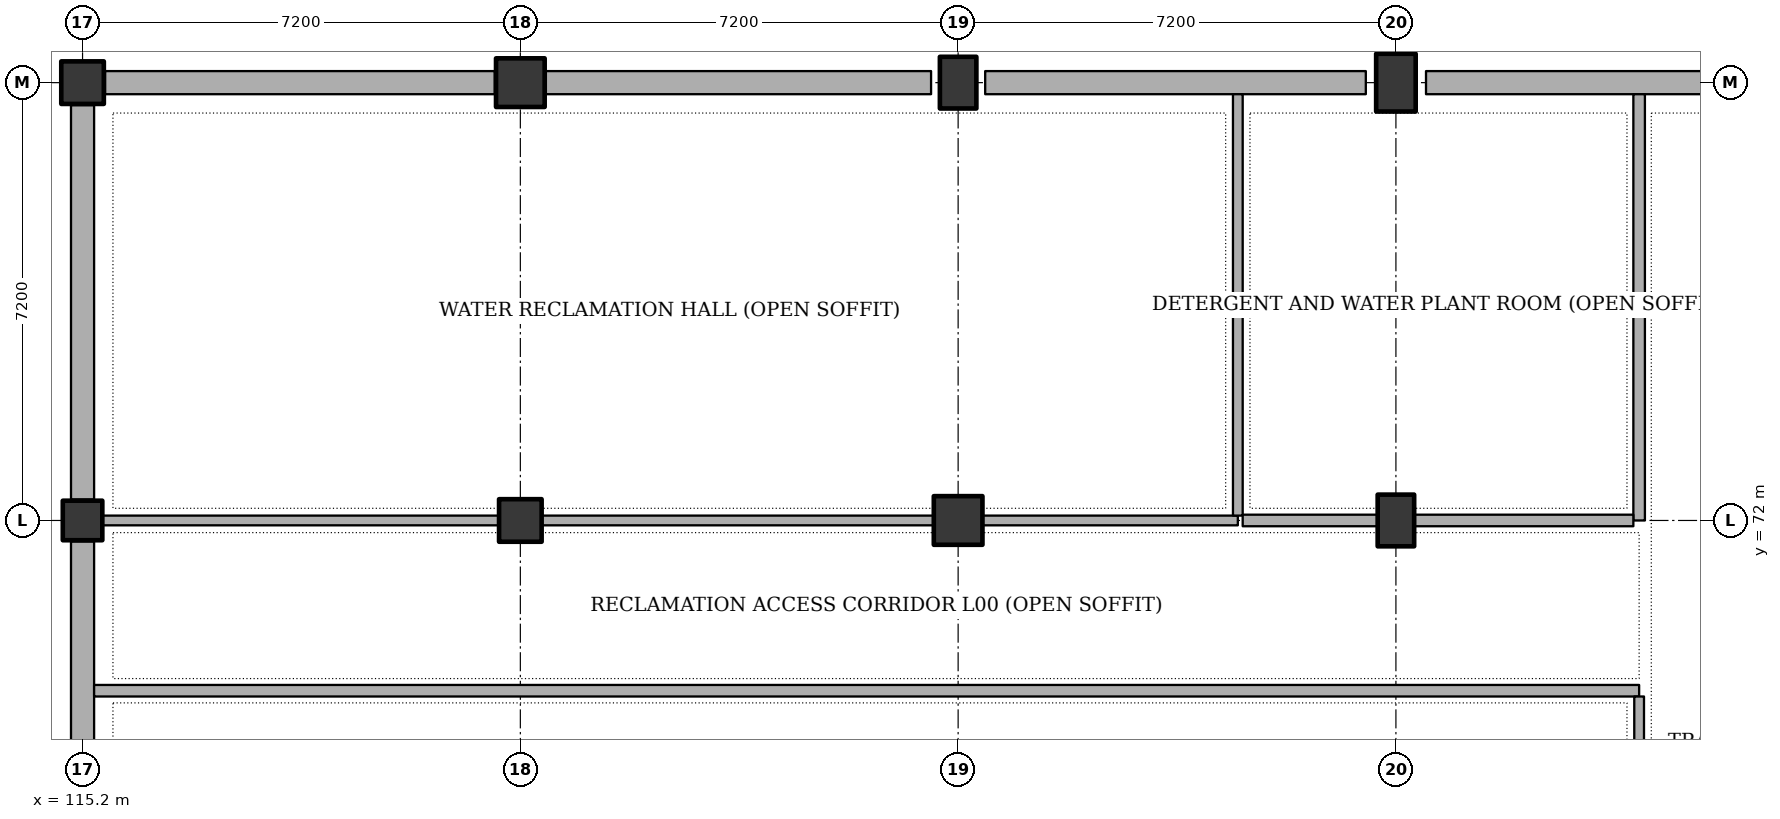
"""IFC4 building model, lengths in metres.
Left out: names, types, materials, properties, quantities, classifications, styles, units other than length and angle.
Written with IfcOpenShell. Run it as: python <this file> out.ifc"""

import sys

from ifc_helpers import new_model, si_unit, direction, frame, frame_2d, origin, origin_2d, place, context, subcontext, project, spatial, rectangle, extrude, element, fill, save


model = new_model("IFC4")
c1 = context("Model", 3, precision=1e-05, world=origin(), true_north=direction((0.0, 1.0)))
c2 = subcontext(c1, "Body", "Model", "MODEL_VIEW")
j1 = project(units=[si_unit("LENGTHUNIT", "METRE"), si_unit("PLANEANGLEUNIT", "RADIAN")], contexts=[c1])
p1 = place(None, origin())
s1 = spatial("IfcSite", under=j1, at=p1, CompositionType="ELEMENT")
p2 = place(p1, origin())
s2 = spatial("IfcBuilding", under=s1, at=p2, CompositionType="ELEMENT")
p3 = place(p2, origin())
s3 = spatial("IfcBuildingStorey", under=s2, at=p3, CompositionType="ELEMENT", Elevation=0.0)
p4 = place(p3, frame((115.2, 72.0, -0.3), z_axis=(0.0, 0.0, 1.0), x_axis=(1.0, 0.0, 0.0)))
e1 = element("IfcColumn", 1, at=p4, inside=s3, PredefinedType="COLUMN", context=c2, shape_type="SweptSolid", body=[
    extrude(rectangle(XDim=0.65, YDim=0.65, at=origin_2d()), origin(), (0.0, 0.0, 1.0), 5.7),
])
for number, where, z_axis, x_axis in (
    (2, (115.2, 79.2, -0.3), (0.0, 0.0, 1.0), (1.0, 0.0, 0.0)),
    (3, (122.4, 72.0, -0.3), (0.0, 0.0, 1.0), (1.0, 0.0, 0.0)),
):
    element("IfcColumn", number, at=place(p3, frame(where, z_axis=z_axis, x_axis=x_axis)), inside=s3, PredefinedType="COLUMN", context=c2, shape_type="SweptSolid", body=[
        extrude(rectangle(XDim=0.7, YDim=0.7, at=origin_2d()), origin(), (0.0, 0.0, 1.0), 5.7),
    ])
for number, where, z_axis, x_axis in (
    (4, (122.4, 79.2, -0.3), (0.0, 0.0, 1.0), (1.0, 0.0, 0.0)),
    (5, (129.6, 72.0, -0.3), (0.0, 0.0, 1.0), (1.0, 0.0, 0.0)),
):
    element("IfcColumn", number, at=place(p3, frame(where, z_axis=z_axis, x_axis=x_axis)), inside=s3, PredefinedType="COLUMN", context=c2, shape_type="SweptSolid", body=[
        extrude(rectangle(XDim=0.8, YDim=0.8, at=origin_2d()), origin(), (0.0, 0.0, 1.0), 5.7),
    ])
for number, where, z_axis, x_axis in (
    (6, (129.6, 79.2, -0.3), (0.0, 0.0, 1.0), (1.0, 0.0, 0.0)),
    (7, (136.8, 72.0, -0.3), (0.0, 0.0, 1.0), (1.0, 0.0, 0.0)),
):
    element("IfcColumn", number, at=place(p3, frame(where, z_axis=z_axis, x_axis=x_axis)), inside=s3, PredefinedType="COLUMN", context=c2, shape_type="SweptSolid", body=[
        extrude(rectangle(XDim=0.6, YDim=0.85, at=origin_2d()), origin(), (0.0, 0.0, 1.0), 5.7),
    ])
p5 = place(p3, frame((136.8, 79.2, -0.3), z_axis=(0.0, 0.0, 1.0), x_axis=(1.0, 0.0, 0.0)))
e8 = element("IfcColumn", 8, at=p5, inside=s3, PredefinedType="COLUMN", context=c2, shape_type="SweptSolid", body=[
    extrude(rectangle(XDim=0.65, YDim=0.95, at=origin_2d()), origin(), (0.0, 0.0, 1.0), 5.7),
])
p6 = place(p3, frame((115.2, 65.095, 0.0), z_axis=(0.0, 0.0, 1.0), x_axis=(0.0, 1.0, 0.0)))
e9 = element("IfcWall", 9, at=p6, inside=s3, PredefinedType="SOLIDWALL", context=c2, shape_type="SweptSolid", body=[
    extrude(rectangle(XDim=6.56, YDim=0.38, at=frame_2d((3.28, 0.0))), origin(), (0.0, 0.0, 1.0), 4.523),
])
p7 = place(p6, frame((1.43, 0.0, 0.0)))
e10 = element("IfcOpeningElement", 10, at=p7, cuts=e9, PredefinedType="OPENING", context=c2, shape_type="SweptSolid", body=[
    extrude(rectangle(XDim=3.7, YDim=4.4, at=frame_2d((1.85, 2.2))), frame((0.0, 0.2, 0.0), z_axis=(0.0, -1.0, 0.0), x_axis=(1.0, 0.0, 0.0)), (0.0, 0.0, 1.0), 0.4),
])
p8 = place(p3, frame((115.2, 72.345, 0.0), z_axis=(0.0, 0.0, 1.0), x_axis=(0.0, 1.0, 0.0)))
e11 = element("IfcWall", 11, at=p8, inside=s3, PredefinedType="SOLIDWALL", context=c2, shape_type="SweptSolid", body=[
    extrude(rectangle(XDim=6.485, YDim=0.38, at=frame_2d((3.243, 0.0))), origin(), (0.0, 0.0, 1.0), 4.6),
])
p9 = place(p8, frame((2.593, 0.0, 1.05)))
e12 = element("IfcOpeningElement", 12, at=p9, cuts=e11, PredefinedType="OPENING", context=c2, shape_type="SweptSolid", body=[
    extrude(rectangle(XDim=1.3, YDim=1.6, at=frame_2d((0.65, 0.8))), frame((0.0, 0.2, 0.0), z_axis=(0.0, -1.0, 0.0), x_axis=(1.0, 0.0, 0.0)), (0.0, 0.0, 1.0), 0.4),
])
p10 = place(p3, frame((115.57, 79.2, 0.0), z_axis=(0.0, 0.0, 1.0), x_axis=(1.0, 0.0, 0.0)))
e13 = element("IfcWall", 13, at=p10, inside=s3, PredefinedType="SOLIDWALL", context=c2, shape_type="SweptSolid", body=[
    extrude(rectangle(XDim=6.41, YDim=0.38, at=frame_2d((3.205, 0.0))), origin(), (0.0, 0.0, 1.0), 4.65),
])
p11 = place(p3, frame((122.82, 79.2, 0.0), z_axis=(0.0, 0.0, 1.0), x_axis=(1.0, 0.0, 0.0)))
e14 = element("IfcWall", 14, at=p11, inside=s3, PredefinedType="SOLIDWALL", context=c2, shape_type="SweptSolid", body=[
    extrude(rectangle(XDim=6.335, YDim=0.38, at=frame_2d((3.167, 0.0))), origin(), (0.0, 0.0, 1.0), 4.65),
])
p12 = place(p11, frame((2.192, 0.0, 1.05)))
e15 = element("IfcOpeningElement", 15, at=p12, cuts=e14, PredefinedType="OPENING", context=c2, shape_type="SweptSolid", body=[
    extrude(rectangle(XDim=1.95, YDim=2.25, at=frame_2d((0.975, 1.125))), frame((0.0, 0.2, 0.0), z_axis=(0.0, -1.0, 0.0), x_axis=(1.0, 0.0, 0.0)), (0.0, 0.0, 1.0), 0.4),
])
p13 = place(p3, frame((130.045, 79.2, 0.0), z_axis=(0.0, 0.0, 1.0), x_axis=(1.0, 0.0, 0.0)))
e16 = element("IfcWall", 16, at=p13, inside=s3, PredefinedType="SOLIDWALL", context=c2, shape_type="SweptSolid", body=[
    extrude(rectangle(XDim=6.26, YDim=0.38, at=frame_2d((3.13, 0.0))), origin(), (0.0, 0.0, 1.0), 4.65),
])
p14 = place(p3, frame((137.295, 79.2, 0.0), z_axis=(0.0, 0.0, 1.0), x_axis=(1.0, 0.0, 0.0)))
e17 = element("IfcWall", 17, at=p14, inside=s3, PredefinedType="SOLIDWALL", context=c2, shape_type="SweptSolid", body=[
    extrude(rectangle(XDim=6.547, YDim=0.38, at=frame_2d((3.273, 0.0))), origin(), (0.0, 0.0, 1.0), 4.6),
])
p15 = place(p14, frame((4.35, 0.0, 0.0)))
e18 = element("IfcOpeningElement", 18, at=p15, cuts=e17, PredefinedType="OPENING", context=c2, shape_type="SweptSolid", body=[
    extrude(rectangle(XDim=1.35, YDim=2.15, at=frame_2d((0.675, 1.075))), frame((0.0, 0.2, 0.0), z_axis=(0.0, -1.0, 0.0), x_axis=(1.0, 0.0, 0.0)), (0.0, 0.0, 1.0), 0.4),
])
p16 = place(p3, frame((115.39, 69.2, 0.0), z_axis=(0.0, 0.0, 1.0), x_axis=(1.0, 0.0, 0.0)))
e19 = element("IfcWall", 19, at=p16, inside=s3, PredefinedType="PARTITIONING", context=c2, shape_type="SweptSolid", body=[
    extrude(rectangle(XDim=25.41, YDim=0.19, at=frame_2d((12.705, 0.0))), origin(), (0.0, 0.0, 1.0), 3.55),
])
p17 = place(p16, frame((17.612, 0.0, 0.0)))
e20 = element("IfcOpeningElement", 20, at=p17, cuts=e19, PredefinedType="OPENING", context=c2, shape_type="SweptSolid", body=[
    extrude(rectangle(XDim=1.75, YDim=2.25, at=frame_2d((0.875, 1.125))), frame((0.0, 0.105, 0.0), z_axis=(0.0, -1.0, 0.0), x_axis=(1.0, 0.0, 0.0)), (0.0, 0.0, 1.0), 0.21),
])
p18 = place(p3, frame((115.527, 72.0, 0.0), z_axis=(0.0, 0.0, 1.0), x_axis=(1.0, 0.0, 0.0)))
e21 = element("IfcWall", 21, at=p18, inside=s3, PredefinedType="PARTITIONING", context=c2, shape_type="SweptSolid", body=[
    extrude(rectangle(XDim=6.521, YDim=0.16, at=frame_2d((3.26, 0.0))), origin(), (0.0, 0.0, 1.0), 3.55),
])
p19 = place(p3, frame((122.752, 72.0, 0.0), z_axis=(0.0, 0.0, 1.0), x_axis=(1.0, 0.0, 0.0)))
e22 = element("IfcWall", 22, at=p19, inside=s3, PredefinedType="PARTITIONING", context=c2, shape_type="SweptSolid", body=[
    extrude(rectangle(XDim=6.446, YDim=0.16, at=frame_2d((3.223, 0.0))), origin(), (0.0, 0.0, 1.0), 3.55),
])
p20 = place(p19, frame((2.348, 0.0, 0.0)))
e23 = element("IfcOpeningElement", 23, at=p20, cuts=e22, PredefinedType="OPENING", context=c2, shape_type="SweptSolid", body=[
    extrude(rectangle(XDim=1.75, YDim=2.25, at=frame_2d((0.875, 1.125))), frame((0.0, 0.09, 0.0), z_axis=(0.0, -1.0, 0.0), x_axis=(1.0, 0.0, 0.0)), (0.0, 0.0, 1.0), 0.18),
])
p21 = place(p3, frame((130.002, 72.0, 0.0), z_axis=(0.0, 0.0, 1.0), x_axis=(1.0, 0.0, 0.0)))
e24 = element("IfcWall", 24, at=p21, inside=s3, PredefinedType="PARTITIONING", context=c2, shape_type="SweptSolid", body=[
    extrude(rectangle(XDim=4.198, YDim=0.16, at=frame_2d((2.099, 0.0))), origin(), (0.0, 0.0, 1.0), 3.55),
])
p22 = place(p3, frame((140.8, 72.0, 0.0), z_axis=(0.0, 0.0, 1.0), x_axis=(0.0, 1.0, 0.0)))
e25 = element("IfcWall", 25, at=p22, inside=s3, PredefinedType="PARTITIONING", context=c2, shape_type="SweptSolid", body=[
    extrude(rectangle(XDim=7.01, YDim=0.19, at=frame_2d((3.505, 0.0))), origin(), (0.0, 0.0, 1.0), 3.55),
])
p23 = place(p22, frame((2.825, 0.0, 0.0)))
e26 = element("IfcOpeningElement", 26, at=p23, cuts=e25, PredefinedType="OPENING", context=c2, shape_type="SweptSolid", body=[
    extrude(rectangle(XDim=1.25, YDim=2.15, at=frame_2d((0.625, 1.075))), frame((0.0, 0.105, 0.0), z_axis=(0.0, -1.0, 0.0), x_axis=(1.0, 0.0, 0.0)), (0.0, 0.0, 1.0), 0.21),
])
p24 = place(p3, frame((140.8, 50.59, 0.0), z_axis=(0.0, 0.0, 1.0), x_axis=(0.0, 1.0, 0.0)))
e27 = element("IfcWall", 27, at=p24, inside=s3, PredefinedType="PARTITIONING", context=c2, shape_type="SweptSolid", body=[
    extrude(rectangle(XDim=18.515, YDim=0.16, at=frame_2d((9.257, 0.0))), origin(), (0.0, 0.0, 1.0), 3.55),
])
p25 = place(p3, frame((134.2, 72.08, 0.0), z_axis=(0.0, 0.0, 1.0), x_axis=(0.0, 1.0, 0.0)))
e28 = element("IfcWall", 28, at=p25, inside=s3, PredefinedType="PARTITIONING", context=c2, shape_type="SweptSolid", body=[
    extrude(rectangle(XDim=6.93, YDim=0.16, at=frame_2d((3.465, 0.0))), origin(), (0.0, 0.0, 1.0), 3.55),
])
p26 = place(p3, frame((134.28, 72.0, 0.0), z_axis=(0.0, 0.0, 1.0), x_axis=(1.0, 0.0, 0.0)))
e29 = element("IfcWall", 29, at=p26, inside=s3, PredefinedType="PARTITIONING", context=c2, shape_type="SweptSolid", body=[
    extrude(rectangle(XDim=2.218, YDim=0.19, at=frame_2d((1.109, 0.0))), origin(), (0.0, 0.0, 1.0), 3.55),
])
p27 = place(p3, frame((137.102, 72.0, 0.0), z_axis=(0.0, 0.0, 1.0), x_axis=(1.0, 0.0, 0.0)))
e30 = element("IfcWall", 30, at=p27, inside=s3, PredefinedType="PARTITIONING", context=c2, shape_type="SweptSolid", body=[
    extrude(rectangle(XDim=3.603, YDim=0.19, at=frame_2d((1.802, 0.0))), origin(), (0.0, 0.0, 1.0), 3.55),
])
p28 = place(p9, origin())
e31 = element("IfcWindow", 31, at=p28, inside=s3, PartitioningType="SINGLE_PANEL", PredefinedType="WINDOW", context=c2, shape_type="SweptSolid", body=[
    extrude(rectangle(XDim=1.3, YDim=1.6, at=frame_2d((0.65, 0.8))), frame((0.0, 0.03, 0.0), z_axis=(0.0, -1.0, 0.0), x_axis=(1.0, 0.0, 0.0)), (0.0, 0.0, 1.0), 0.06),
])
fill(e12, e31)
p29 = place(p12, origin())
e32 = element("IfcWindow", 32, at=p29, inside=s3, PartitioningType="SINGLE_PANEL", PredefinedType="WINDOW", context=c2, shape_type="SweptSolid", body=[
    extrude(rectangle(XDim=1.95, YDim=2.25, at=frame_2d((0.975, 1.125))), frame((0.0, 0.03, 0.0), z_axis=(0.0, -1.0, 0.0), x_axis=(1.0, 0.0, 0.0)), (0.0, 0.0, 1.0), 0.06),
])
fill(e15, e32)
p30 = place(p15, origin())
e33 = element("IfcDoor", 33, at=p30, inside=s3, OperationType="SINGLE_SWING_RIGHT", PredefinedType="DOOR", context=c2, shape_type="SweptSolid", body=[
    extrude(rectangle(XDim=1.35, YDim=2.15, at=frame_2d((0.675, 1.075))), frame((0.0, 0.025, 0.0), z_axis=(0.0, -1.0, 0.0), x_axis=(1.0, 0.0, 0.0)), (0.0, 0.0, 1.0), 0.05),
])
fill(e18, e33)
p31 = place(p7, origin())
e34 = element("IfcDoor", 34, at=p31, inside=s3, OperationType="ROLLINGUP", PredefinedType="GATE", context=c2, shape_type="SweptSolid", body=[
    extrude(rectangle(XDim=3.7, YDim=4.4, at=frame_2d((1.85, 2.2))), frame((0.0, 0.025, 0.0), z_axis=(0.0, -1.0, 0.0), x_axis=(1.0, 0.0, 0.0)), (0.0, 0.0, 1.0), 0.05),
])
fill(e10, e34)
p32 = place(p17, origin())
e35 = element("IfcDoor", 35, at=p32, inside=s3, OperationType="DOUBLE_SWING_LEFT", PredefinedType="DOOR", context=c2, shape_type="SweptSolid", body=[
    extrude(rectangle(XDim=1.75, YDim=2.25, at=frame_2d((0.875, 1.125))), frame((0.0, 0.025, 0.0), z_axis=(0.0, -1.0, 0.0), x_axis=(1.0, 0.0, 0.0)), (0.0, 0.0, 1.0), 0.05),
])
fill(e20, e35)
p33 = place(p20, origin())
e36 = element("IfcDoor", 36, at=p33, inside=s3, OperationType="DOUBLE_SWING_LEFT", PredefinedType="DOOR", context=c2, shape_type="SweptSolid", body=[
    extrude(rectangle(XDim=1.75, YDim=2.25, at=frame_2d((0.875, 1.125))), frame((0.0, 0.025, 0.0), z_axis=(0.0, -1.0, 0.0), x_axis=(1.0, 0.0, 0.0)), (0.0, 0.0, 1.0), 0.05),
])
fill(e23, e36)
p34 = place(p23, origin())
e37 = element("IfcDoor", 37, at=p34, inside=s3, OperationType="SINGLE_SWING_LEFT", PredefinedType="DOOR", context=c2, shape_type="SweptSolid", body=[
    extrude(rectangle(XDim=1.25, YDim=2.15, at=frame_2d((0.625, 1.075))), frame((0.0, 0.025, 0.0), z_axis=(0.0, -1.0, 0.0), x_axis=(1.0, 0.0, 0.0)), (0.0, 0.0, 1.0), 0.05),
])
fill(e26, e37)
save(model, sys.argv[1])
